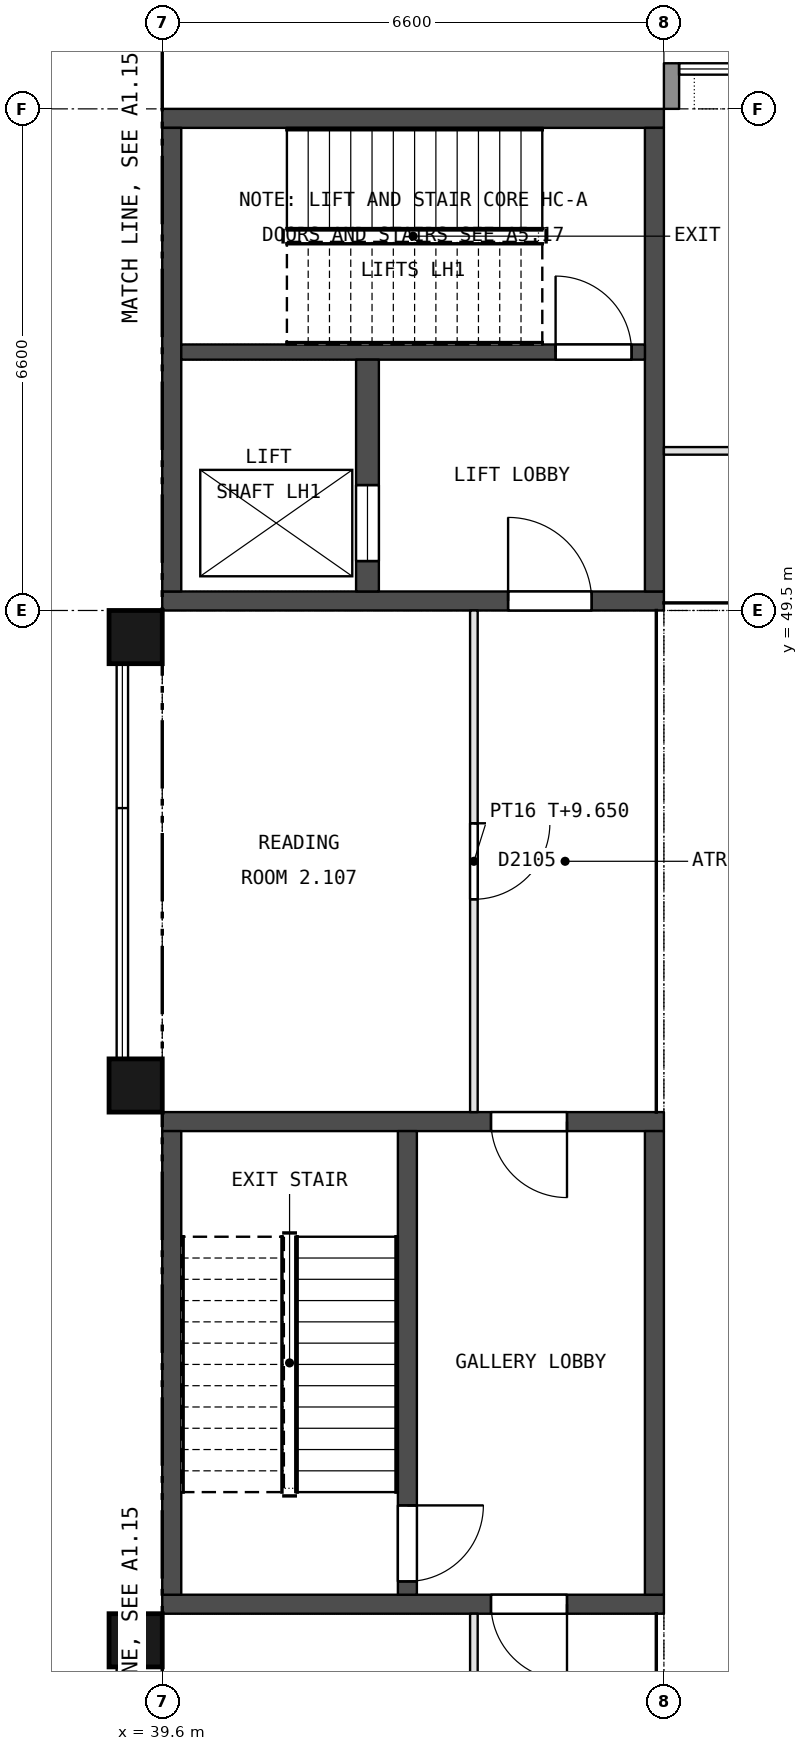
"""IFC4 building model, lengths in metres.
Left out: names, types, materials, properties, quantities, classifications, styles, units other than length and angle.
Written with IfcOpenShell. Run it as: python <this file> out.ifc"""

import sys

from ifc_helpers import new_model, si_unit, direction, frame, frame_2d, origin, origin_2d, place, context, subcontext, project, spatial, rectangle, extrude, element, fill, save


model = new_model("IFC4")
c1 = context("Model", 3, precision=1e-05, world=origin(), true_north=direction((0.0, 1.0)))
c2 = subcontext(c1, "Body", "Model", "MODEL_VIEW")
j1 = project(units=[si_unit("LENGTHUNIT", "METRE"), si_unit("PLANEANGLEUNIT", "RADIAN")], contexts=[c1])
p1 = place(None, origin())
s1 = spatial("IfcSite", under=j1, at=p1, CompositionType="ELEMENT")
p2 = place(p1, origin())
s2 = spatial("IfcBuilding", under=s1, at=p2, CompositionType="ELEMENT")
p3 = place(p2, frame((0.0, 0.0, 5.4)))
s3 = spatial("IfcBuildingStorey", under=s2, at=p3, CompositionType="ELEMENT", Elevation=5.4)
for number, where, z_axis, x_axis in (
    (1, (39.25, 35.95, 0.0), (0.0, 0.0, 1.0), (1.0, 0.0, 0.0)),
    (2, (39.25, 43.25, 0.0), (0.0, 0.0, 1.0), (1.0, 0.0, 0.0)),
    (3, (39.25, 49.15, 0.0), (0.0, 0.0, 1.0), (1.0, 0.0, 0.0)),
):
    element("IfcColumn", number, at=place(p3, frame(where, z_axis=z_axis, x_axis=x_axis)), inside=s3, PredefinedType="COLUMN", context=c2, shape_type="SweptSolid", body=[
        extrude(rectangle(XDim=0.7, YDim=0.7, at=origin_2d()), origin(), (0.0, 0.0, 1.0), 4.5),
    ])
p4 = place(p3, frame((39.6, 49.625, 0.0), z_axis=(0.0, 0.0, 1.0), x_axis=(1.0, 0.0, 0.0)))
e4 = element("IfcWall", 4, at=p4, inside=s3, PredefinedType="SHEAR", context=c2, shape_type="SweptSolid", body=[
    extrude(rectangle(XDim=6.6, YDim=0.25, at=frame_2d((3.3, 0.0))), origin(), (0.0, 0.0, 1.0), 4.25),
])
p5 = place(p4, frame((4.55, 0.0, 0.0)))
e5 = element("IfcOpeningElement", 5, at=p5, cuts=e4, PredefinedType="OPENING", context=c2, shape_type="SweptSolid", body=[
    extrude(rectangle(XDim=1.1, YDim=2.1, at=frame_2d((0.55, 1.05))), frame((0.0, 0.135, 0.0), z_axis=(0.0, -1.0, 0.0), x_axis=(1.0, 0.0, 0.0)), (0.0, 0.0, 1.0), 0.27),
])
p6 = place(p3, frame((39.6, 55.975, 0.0), z_axis=(0.0, 0.0, 1.0), x_axis=(1.0, 0.0, 0.0)))
e6 = element("IfcWall", 6, at=p6, inside=s3, PredefinedType="SHEAR", context=c2, shape_type="SweptSolid", body=[
    extrude(rectangle(XDim=6.6, YDim=0.25, at=frame_2d((3.3, 0.0))), origin(), (0.0, 0.0, 1.0), 4.25),
])
for number, where, z_axis, x_axis in (
    (7, (46.075, 49.75, 0.0), (0.0, 0.0, 1.0), (0.0, 1.0, 0.0)),
    (8, (39.725, 49.75, 0.0), (0.0, 0.0, 1.0), (0.0, 1.0, 0.0)),
):
    element("IfcWall", number, at=place(p3, frame(where, z_axis=z_axis, x_axis=x_axis)), inside=s3, PredefinedType="SHEAR", context=c2, shape_type="SweptSolid", body=[
        extrude(rectangle(XDim=6.1, YDim=0.25, at=frame_2d((3.05, 0.0))), origin(), (0.0, 0.0, 1.0), 4.25),
    ])
p7 = place(p3, frame((39.85, 52.9, 0.0), z_axis=(0.0, 0.0, 1.0), x_axis=(1.0, 0.0, 0.0)))
e9 = element("IfcWall", 9, at=p7, inside=s3, PredefinedType="SHEAR", context=c2, shape_type="SweptSolid", body=[
    extrude(rectangle(XDim=6.1, YDim=0.2, at=frame_2d((3.05, 0.0))), origin(), (0.0, 0.0, 1.0), 4.25),
])
p8 = place(p7, frame((4.925, 0.0, 0.0)))
e10 = element("IfcOpeningElement", 10, at=p8, cuts=e9, PredefinedType="OPENING", context=c2, shape_type="SweptSolid", body=[
    extrude(rectangle(XDim=1.0, YDim=2.1, at=frame_2d((0.5, 1.05))), frame((0.0, 0.11, 0.0), z_axis=(0.0, -1.0, 0.0), x_axis=(1.0, 0.0, 0.0)), (0.0, 0.0, 1.0), 0.22),
])
p9 = place(p3, frame((42.3, 49.75, 0.0), z_axis=(0.0, 0.0, 1.0), x_axis=(0.0, 1.0, 0.0)))
e11 = element("IfcWall", 11, at=p9, inside=s3, PredefinedType="SHEAR", context=c2, shape_type="SweptSolid", body=[
    extrude(rectangle(XDim=3.05, YDim=0.3, at=frame_2d((1.525, 0.0))), origin(), (0.0, 0.0, 1.0), 4.25),
])
p10 = place(p9, frame((0.4, 0.0, 0.0)))
e12 = element("IfcOpeningElement", 12, at=p10, cuts=e11, PredefinedType="OPENING", context=c2, shape_type="SweptSolid", body=[
    extrude(rectangle(XDim=1.0, YDim=2.1, at=frame_2d((0.5, 1.05))), frame((0.0, 0.16, 0.0), z_axis=(0.0, -1.0, 0.0), x_axis=(1.0, 0.0, 0.0)), (0.0, 0.0, 1.0), 0.32),
])
p11 = place(p3, frame((39.6, 36.425, 0.0), z_axis=(0.0, 0.0, 1.0), x_axis=(1.0, 0.0, 0.0)))
e13 = element("IfcWall", 13, at=p11, inside=s3, PredefinedType="SHEAR", context=c2, shape_type="SweptSolid", body=[
    extrude(rectangle(XDim=6.6, YDim=0.25, at=frame_2d((3.3, 0.0))), origin(), (0.0, 0.0, 1.0), 4.25),
])
p12 = place(p11, frame((4.325, 0.0, 0.0)))
e14 = element("IfcOpeningElement", 14, at=p12, cuts=e13, PredefinedType="OPENING", context=c2, shape_type="SweptSolid", body=[
    extrude(rectangle(XDim=1.0, YDim=2.1, at=frame_2d((0.5, 1.05))), frame((0.0, 0.135, 0.0), z_axis=(0.0, -1.0, 0.0), x_axis=(1.0, 0.0, 0.0)), (0.0, 0.0, 1.0), 0.27),
])
p13 = place(p3, frame((39.6, 42.775, 0.0), z_axis=(0.0, 0.0, 1.0), x_axis=(1.0, 0.0, 0.0)))
e15 = element("IfcWall", 15, at=p13, inside=s3, PredefinedType="SHEAR", context=c2, shape_type="SweptSolid", body=[
    extrude(rectangle(XDim=6.6, YDim=0.25, at=frame_2d((3.3, 0.0))), origin(), (0.0, 0.0, 1.0), 4.25),
])
p14 = place(p13, frame((4.325, 0.0, 0.0)))
e16 = element("IfcOpeningElement", 16, at=p14, cuts=e15, PredefinedType="OPENING", context=c2, shape_type="SweptSolid", body=[
    extrude(rectangle(XDim=1.0, YDim=2.1, at=frame_2d((0.5, 1.05))), frame((0.0, 0.135, 0.0), z_axis=(0.0, -1.0, 0.0), x_axis=(1.0, 0.0, 0.0)), (0.0, 0.0, 1.0), 0.27),
])
for number, where, z_axis, x_axis in (
    (17, (39.725, 36.55, 0.0), (0.0, 0.0, 1.0), (0.0, 1.0, 0.0)),
    (18, (46.075, 36.55, 0.0), (0.0, 0.0, 1.0), (0.0, 1.0, 0.0)),
):
    element("IfcWall", number, at=place(p3, frame(where, z_axis=z_axis, x_axis=x_axis)), inside=s3, PredefinedType="SHEAR", context=c2, shape_type="SweptSolid", body=[
        extrude(rectangle(XDim=6.1, YDim=0.25, at=frame_2d((3.05, 0.0))), origin(), (0.0, 0.0, 1.0), 4.25),
    ])
p15 = place(p3, frame((42.825, 36.55, 0.0), z_axis=(0.0, 0.0, 1.0), x_axis=(0.0, 1.0, 0.0)))
e19 = element("IfcWall", 19, at=p15, inside=s3, PredefinedType="SHEAR", context=c2, shape_type="SweptSolid", body=[
    extrude(rectangle(XDim=6.1, YDim=0.25, at=frame_2d((3.05, 0.0))), origin(), (0.0, 0.0, 1.0), 4.25),
])
p16 = place(p15, frame((0.175, 0.0, 0.0)))
e20 = element("IfcOpeningElement", 20, at=p16, cuts=e19, PredefinedType="OPENING", context=c2, shape_type="SweptSolid", body=[
    extrude(rectangle(XDim=1.0, YDim=2.1, at=frame_2d((0.5, 1.05))), frame((0.0, 0.135, 0.0), z_axis=(0.0, -1.0, 0.0), x_axis=(1.0, 0.0, 0.0)), (0.0, 0.0, 1.0), 0.27),
])
p17 = place(p3, frame((46.3, 56.1, 0.0), z_axis=(0.0, 0.0, 1.0), x_axis=(0.0, 1.0, 0.0)))
e21 = element("IfcWall", 21, at=p17, inside=s3, PredefinedType="STANDARD", context=c2, shape_type="SweptSolid", body=[
    extrude(rectangle(XDim=0.6, YDim=0.2, at=frame_2d((0.3, 0.0))), origin(), (0.0, 0.0, 1.0), 3.45),
])
for number, where, z_axis, x_axis in (
    (22, (39.6, 36.2, 0.0), (0.0, 0.0, 1.0), (-1.0, 0.0, 0.0)),
    (23, (39.6, 43.0, 0.0), (0.0, 0.0, 1.0), (-1.0, 0.0, 0.0)),
    (24, (39.6, 49.4, 0.0), (0.0, 0.0, 1.0), (-1.0, 0.0, 0.0)),
):
    element("IfcWall", number, at=place(p3, frame(where, z_axis=z_axis, x_axis=x_axis)), inside=s3, PredefinedType="STANDARD", context=c2, shape_type="SweptSolid", body=[
        extrude(rectangle(XDim=0.6, YDim=0.2, at=frame_2d((0.3, 0.0))), origin(), (0.0, 0.0, 1.0), 3.45),
    ])
p18 = place(p3, frame((46.2, 51.6, 0.0), z_axis=(0.0, 0.0, 1.0), x_axis=(1.0, 0.0, 0.0)))
e25 = element("IfcWall", 25, at=p18, inside=s3, PredefinedType="PARTITIONING", context=c2, shape_type="SweptSolid", body=[
    extrude(rectangle(XDim=13.25, YDim=0.1, at=frame_2d((6.625, 0.0))), origin(), (0.0, 0.0, 1.0), 4.25),
])
p19 = place(p18, frame((5.85, 0.0, 0.0)))
e26 = element("IfcOpeningElement", 26, at=p19, cuts=e25, PredefinedType="OPENING", context=c2, shape_type="SweptSolid", body=[
    extrude(rectangle(XDim=1.5, YDim=2.1, at=frame_2d((0.75, 1.05))), frame((0.0, 0.06, 0.0), z_axis=(0.0, -1.0, 0.0), x_axis=(1.0, 0.0, 0.0)), (0.0, 0.0, 1.0), 0.12),
])
p20 = place(p3, frame((43.7, 23.25, 0.0), z_axis=(0.0, 0.0, 1.0), x_axis=(0.0, 1.0, 0.0)))
e27 = element("IfcWall", 27, at=p20, inside=s3, PredefinedType="PARTITIONING", context=c2, shape_type="SweptSolid", body=[
    extrude(rectangle(XDim=13.05, YDim=0.1, at=frame_2d((6.525, 0.0))), origin(), (0.0, 0.0, 1.0), 3.5),
])
p21 = place(p20, frame((2.65, 0.0, 0.0)))
e28 = element("IfcOpeningElement", 28, at=p21, cuts=e27, PredefinedType="OPENING", context=c2, shape_type="SweptSolid", body=[
    extrude(rectangle(XDim=1.0, YDim=2.1, at=frame_2d((0.5, 1.05))), frame((0.0, 0.06, 0.0), z_axis=(0.0, -1.0, 0.0), x_axis=(1.0, 0.0, 0.0)), (0.0, 0.0, 1.0), 0.12),
])
p22 = place(p20, frame((9.25, 0.0, 0.0)))
e29 = element("IfcOpeningElement", 29, at=p22, cuts=e27, PredefinedType="OPENING", context=c2, shape_type="SweptSolid", body=[
    extrude(rectangle(XDim=1.0, YDim=2.1, at=frame_2d((0.5, 1.05))), frame((0.0, 0.06, 0.0), z_axis=(0.0, -1.0, 0.0), x_axis=(1.0, 0.0, 0.0)), (0.0, 0.0, 1.0), 0.12),
])
p23 = place(p3, frame((43.7, 42.9, 0.0), z_axis=(0.0, 0.0, 1.0), x_axis=(0.0, 1.0, 0.0)))
e30 = element("IfcWall", 30, at=p23, inside=s3, PredefinedType="PARTITIONING", context=c2, shape_type="SweptSolid", body=[
    extrude(rectangle(XDim=6.6, YDim=0.1, at=frame_2d((3.3, 0.0))), origin(), (0.0, 0.0, 1.0), 4.25),
])
p24 = place(p23, frame((2.8, 0.0, 0.0)))
e31 = element("IfcOpeningElement", 31, at=p24, cuts=e30, PredefinedType="OPENING", context=c2, shape_type="SweptSolid", body=[
    extrude(rectangle(XDim=1.0, YDim=2.1, at=frame_2d((0.5, 1.05))), frame((0.0, 0.06, 0.0), z_axis=(0.0, -1.0, 0.0), x_axis=(1.0, 0.0, 0.0)), (0.0, 0.0, 1.0), 0.12),
])
p25 = place(p5, origin())
e32 = element("IfcDoor", 32, at=p25, inside=s3, OperationType="SINGLE_SWING_LEFT", PredefinedType="DOOR", context=c2, shape_type="SweptSolid", body=[
    extrude(rectangle(XDim=1.1, YDim=2.1, at=frame_2d((0.55, 1.05))), frame((0.0, 0.025, 0.0), z_axis=(0.0, -1.0, 0.0), x_axis=(1.0, 0.0, 0.0)), (0.0, 0.0, 1.0), 0.05),
])
fill(e5, e32)
p26 = place(p8, origin())
e33 = element("IfcDoor", 33, at=p26, inside=s3, OperationType="SINGLE_SWING_LEFT", PredefinedType="DOOR", context=c2, shape_type="SweptSolid", body=[
    extrude(rectangle(XDim=1.0, YDim=2.1, at=frame_2d((0.5, 1.05))), frame((0.0, 0.025, 0.0), z_axis=(0.0, -1.0, 0.0), x_axis=(1.0, 0.0, 0.0)), (0.0, 0.0, 1.0), 0.05),
])
fill(e10, e33)
p27 = place(p10, origin())
e34 = element("IfcDoor", 34, at=p27, inside=s3, OperationType="DOUBLE_DOOR_SLIDING", PredefinedType="NOTDEFINED", context=c2, shape_type="SweptSolid", body=[
    extrude(rectangle(XDim=1.0, YDim=2.1, at=frame_2d((0.5, 1.05))), frame((0.0, 0.025, 0.0), z_axis=(0.0, -1.0, 0.0), x_axis=(1.0, 0.0, 0.0)), (0.0, 0.0, 1.0), 0.05),
])
fill(e12, e34)
p28 = place(p12, origin())
e35 = element("IfcDoor", 35, at=p28, inside=s3, OperationType="SINGLE_SWING_RIGHT", PredefinedType="DOOR", context=c2, shape_type="SweptSolid", body=[
    extrude(rectangle(XDim=1.0, YDim=2.1, at=frame_2d((0.5, 1.05))), frame((0.0, 0.025, 0.0), z_axis=(0.0, -1.0, 0.0), x_axis=(1.0, 0.0, 0.0)), (0.0, 0.0, 1.0), 0.05),
])
fill(e14, e35)
p29 = place(p14, origin())
e36 = element("IfcDoor", 36, at=p29, inside=s3, OperationType="SINGLE_SWING_RIGHT", PredefinedType="DOOR", context=c2, shape_type="SweptSolid", body=[
    extrude(rectangle(XDim=1.0, YDim=2.1, at=frame_2d((0.5, 1.05))), frame((0.0, 0.025, 0.0), z_axis=(0.0, -1.0, 0.0), x_axis=(1.0, 0.0, 0.0)), (0.0, 0.0, 1.0), 0.05),
])
fill(e16, e36)
p30 = place(p16, origin())
e37 = element("IfcDoor", 37, at=p30, inside=s3, OperationType="SINGLE_SWING_RIGHT", PredefinedType="DOOR", context=c2, shape_type="SweptSolid", body=[
    extrude(rectangle(XDim=1.0, YDim=2.1, at=frame_2d((0.5, 1.05))), frame((0.0, 0.025, 0.0), z_axis=(0.0, -1.0, 0.0), x_axis=(1.0, 0.0, 0.0)), (0.0, 0.0, 1.0), 0.05),
])
fill(e20, e37)
p31 = place(p24, origin())
e38 = element("IfcDoor", 38, at=p31, inside=s3, OperationType="SINGLE_SWING_RIGHT", PredefinedType="DOOR", context=c2, shape_type="SweptSolid", body=[
    extrude(rectangle(XDim=1.0, YDim=2.1, at=frame_2d((0.5, 1.05))), frame((0.0, 0.025, 0.0), z_axis=(0.0, -1.0, 0.0), x_axis=(1.0, 0.0, 0.0)), (0.0, 0.0, 1.0), 0.05),
])
fill(e31, e38)
save(model, sys.argv[1])
